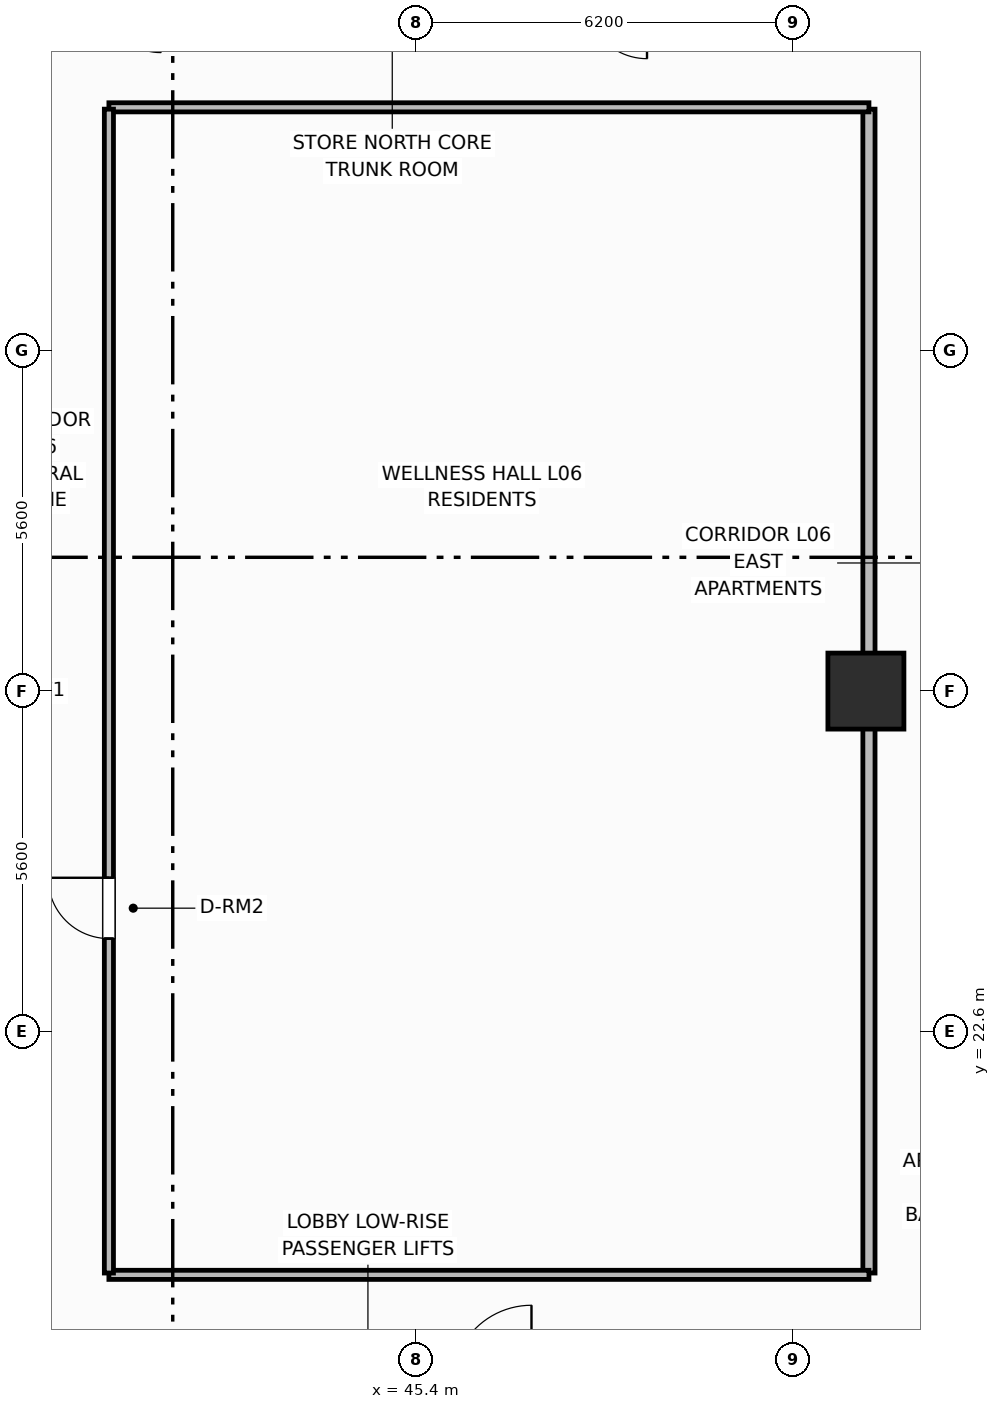
"""IFC4 building model, lengths in metres.
Left out: names, types, materials, properties, quantities, classifications, styles, units other than length and angle.
Written with IfcOpenShell. Run it as: python <this file> out.ifc"""

import sys

from ifc_helpers import new_model, si_unit, direction, frame, frame_2d, origin, origin_2d, place, context, subcontext, project, spatial, rectangle, extrude, element, fill, save


model = new_model("IFC4")
c1 = context("Model", 3, precision=1e-05, world=origin(), true_north=direction((0.0, 1.0)))
c2 = subcontext(c1, "Body", "Model", "MODEL_VIEW")
j1 = project(units=[si_unit("LENGTHUNIT", "METRE"), si_unit("PLANEANGLEUNIT", "RADIAN")], contexts=[c1])
p1 = place(None, origin())
s1 = spatial("IfcSite", under=j1, at=p1, CompositionType="ELEMENT")
p2 = place(p1, origin())
s2 = spatial("IfcBuilding", under=s1, at=p2, CompositionType="ELEMENT")
p3 = place(p2, frame((0.0, 0.0, 28.8)))
s3 = spatial("IfcBuildingStorey", under=s2, at=p3, CompositionType="ELEMENT", Elevation=28.8)
p4 = place(p3, frame((52.8, 28.2, 0.0), z_axis=(0.0, 0.0, 1.0), x_axis=(1.0, 0.0, 0.0)))
e1 = element("IfcColumn", 1, at=p4, inside=s3, PredefinedType="COLUMN", context=c2, shape_type="SweptSolid", body=[
    extrude(rectangle(XDim=1.25, YDim=1.25, at=origin_2d()), origin(), (0.0, 0.0, 1.0), 3.7),
])
p5 = place(p3, frame((52.85, 18.63, 0.0), z_axis=(0.0, 0.0, 1.0), x_axis=(0.0, 1.0, 0.0)))
e2 = element("IfcWall", 2, at=p5, inside=s3, PredefinedType="PARTITIONING", context=c2, shape_type="SweptSolid", body=[
    extrude(rectangle(XDim=19.14, YDim=0.2, at=frame_2d((9.57, 0.0))), origin(), (0.0, 0.0, 1.0), 2.53),
])
for number, where, z_axis, x_axis in (
    (3, (40.35, 18.6, 0.0), (0.0, 0.0, 1.0), (1.0, 0.0, 0.0)),
    (4, (40.35, 37.8, 0.0), (0.0, 0.0, 1.0), (1.0, 0.0, 0.0)),
):
    element("IfcWall", number, at=place(p3, frame(where, z_axis=z_axis, x_axis=x_axis)), inside=s3, PredefinedType="PARTITIONING", context=c2, shape_type="SweptSolid", body=[
        extrude(rectangle(XDim=12.5, YDim=0.15, at=frame_2d((6.25, 0.0))), origin(), (0.0, 0.0, 1.0), 2.53),
    ])
p6 = place(p3, frame((40.35, 18.63, 0.0), z_axis=(0.0, 0.0, 1.0), x_axis=(0.0, 1.0, 0.0)))
e5 = element("IfcWall", 5, at=p6, inside=s3, PredefinedType="PARTITIONING", context=c2, shape_type="SweptSolid", body=[
    extrude(rectangle(XDim=19.14, YDim=0.15, at=frame_2d((9.57, 0.0))), origin(), (0.0, 0.0, 1.0), 2.53),
])
p7 = place(p6, frame((5.5, 0.0, 0.0)))
e6 = element("IfcOpeningElement", 6, at=p7, cuts=e5, PredefinedType="OPENING", context=c2, shape_type="SweptSolid", body=[
    extrude(rectangle(XDim=1.0, YDim=2.15, at=frame_2d((0.5, 1.075))), frame((0.0, 0.085, 0.0), z_axis=(0.0, -1.0, 0.0), x_axis=(1.0, 0.0, 0.0)), (0.0, 0.0, 1.0), 0.17),
])
p8 = place(p7, origin())
e7 = element("IfcDoor", 7, at=p8, inside=s3, OperationType="SINGLE_SWING_RIGHT", PredefinedType="DOOR", context=c2, shape_type="SweptSolid", body=[
    extrude(rectangle(XDim=1.0, YDim=2.15, at=frame_2d((0.5, 1.075))), frame((0.0, 0.025, 0.0), z_axis=(0.0, -1.0, 0.0), x_axis=(1.0, 0.0, 0.0)), (0.0, 0.0, 1.0), 0.05),
])
fill(e6, e7)
save(model, sys.argv[1])
